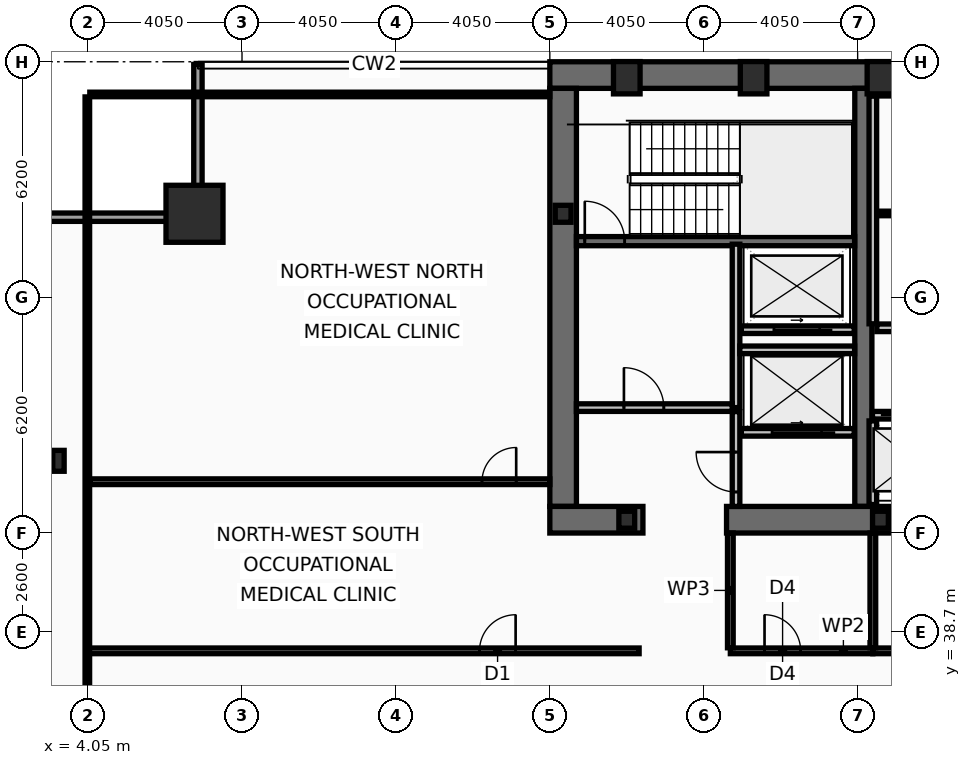
"""IFC4 building model, lengths in metres.
Left out: names, types, materials, properties, quantities, classifications, styles, units other than length and angle.
Written with IfcOpenShell. Run it as: python <this file> out.ifc"""

import sys

from ifc_helpers import new_model, si_unit, direction, frame, frame_2d, origin, origin_2d, place, context, subcontext, project, spatial, rectangle, hollow_rectangle, i_section, extrude, element, fill, save


model = new_model("IFC4")
c1 = context("Model", 3, precision=1e-05, world=origin(), true_north=direction((0.0, 1.0)))
c2 = subcontext(c1, "Body", "Model", "MODEL_VIEW")
j1 = project(units=[si_unit("LENGTHUNIT", "METRE"), si_unit("PLANEANGLEUNIT", "RADIAN")], contexts=[c1])
p1 = place(None, origin())
s1 = spatial("IfcSite", under=j1, at=p1, CompositionType="ELEMENT")
p2 = place(p1, origin())
s2 = spatial("IfcBuilding", under=s1, at=p2, CompositionType="ELEMENT")
p3 = place(p2, frame((0.0, 0.0, 132.6)))
s3 = spatial("IfcBuildingStorey", under=s2, at=p3, CompositionType="ELEMENT", Elevation=132.6)
p4 = place(p3, frame((16.2, 53.35, 0.0), z_axis=(0.0, 0.0, 1.0), x_axis=(1.0, 0.0, 0.0)))
e1 = element("IfcWall", 1, at=p4, inside=s3, PredefinedType="SHEAR", context=c2, shape_type="SweptSolid", body=[
    extrude(rectangle(XDim=40.5, YDim=0.7, at=frame_2d((20.25, 0.0))), origin(), (0.0, 0.0, 1.0), 3.44),
])
p5 = place(p3, frame((16.55, 42.0, 0.0), z_axis=(0.0, 0.0, 1.0), x_axis=(0.0, 1.0, 0.0)))
e2 = element("IfcWall", 2, at=p5, inside=s3, PredefinedType="SHEAR", context=c2, shape_type="SweptSolid", body=[
    extrude(rectangle(XDim=11.0, YDim=0.7, at=frame_2d((5.5, 0.0))), origin(), (0.0, 0.0, 1.0), 3.44),
])
p6 = place(p3, frame((24.45, 42.0, 0.0), z_axis=(0.0, 0.0, 1.0), x_axis=(0.0, 1.0, 0.0)))
e3 = element("IfcWall", 3, at=p6, inside=s3, PredefinedType="SHEAR", context=c2, shape_type="SweptSolid", body=[
    extrude(rectangle(XDim=11.0, YDim=0.45, at=frame_2d((5.5, 0.0))), origin(), (0.0, 0.0, 1.0), 3.44),
])
p7 = place(p3, frame((18.65, 41.65, 0.0), z_axis=(0.0, 0.0, 1.0), x_axis=(-1.0, 0.0, 0.0)))
e4 = element("IfcWall", 4, at=p7, inside=s3, PredefinedType="SHEAR", context=c2, shape_type="SweptSolid", body=[
    extrude(rectangle(XDim=2.45, YDim=0.7, at=frame_2d((1.225, 0.0))), origin(), (0.0, 0.0, 1.0), 3.44),
])
p8 = place(p3, frame((32.3, 41.65, 0.0), z_axis=(0.0, 0.0, 1.0), x_axis=(-1.0, 0.0, 0.0)))
e5 = element("IfcWall", 5, at=p8, inside=s3, PredefinedType="SHEAR", context=c2, shape_type="SweptSolid", body=[
    extrude(rectangle(XDim=11.45, YDim=0.7, at=frame_2d((5.725, 0.0))), origin(), (0.0, 0.0, 1.0), 3.44),
])
p9 = place(p3, frame((16.9, 48.98, 0.0), z_axis=(0.0, 0.0, 1.0), x_axis=(1.0, 0.0, 0.0)))
e6 = element("IfcWall", 6, at=p9, inside=s3, PredefinedType="SHEAR", context=c2, shape_type="SweptSolid", body=[
    extrude(rectangle(XDim=7.32, YDim=0.24, at=frame_2d((3.66, 0.0))), origin(), (0.0, 0.0, 1.0), 3.44),
])
p10 = place(p9, frame((0.22, 0.0, 0.0)))
e7 = element("IfcOpeningElement", 7, at=p10, cuts=e6, PredefinedType="OPENING", context=c2, shape_type="SweptSolid", body=[
    extrude(rectangle(XDim=1.05, YDim=2.15, at=frame_2d((0.525, 1.075))), frame((0.0, 0.13, 0.0), z_axis=(0.0, -1.0, 0.0), x_axis=(1.0, 0.0, 0.0)), (0.0, 0.0, 1.0), 0.26),
])
p11 = place(p3, frame((6.85, 49.7, 0.0), z_axis=(0.0, 0.0, 1.0), x_axis=(1.0, 0.0, 0.0)))
e8 = element("IfcColumn", 8, at=p11, inside=s3, PredefinedType="COLUMN", context=c2, shape_type="SweptSolid", body=[
    extrude(hollow_rectangle(XDim=1.5, YDim=1.5, WallThickness=0.07, at=origin_2d()), origin(), (0.0, 0.0, 1.0), 3.6),
])
for number, where, z_axis, x_axis in (
    (9, (18.225, 53.28, 0.0), (0.0, 0.0, 1.0), (1.0, 0.0, 0.0)),
    (10, (21.562, 53.28, 0.0), (0.0, 0.0, 1.0), (1.0, 0.0, 0.0)),
    (11, (24.9, 53.28, 0.0), (0.0, 0.0, 1.0), (1.0, 0.0, 0.0)),
):
    element("IfcColumn", number, at=place(p3, frame(where, z_axis=z_axis, x_axis=x_axis)), inside=s3, PredefinedType="COLUMN", context=c2, shape_type="SweptSolid", body=[
        extrude(hollow_rectangle(XDim=0.7, YDim=0.85, WallThickness=0.05, at=origin_2d()), origin(), (0.0, 0.0, 1.0), 3.6),
    ])
p12 = place(p3, frame((3.27, 43.2, 0.0), z_axis=(0.0, 0.0, 1.0), x_axis=(1.0, 0.0, 0.0)))
e12 = element("IfcColumn", 12, at=p12, inside=s3, PredefinedType="COLUMN", context=c2, shape_type="SweptSolid", body=[
    extrude(i_section(OverallWidth=0.3, OverallDepth=0.55, WebThickness=0.015, FlangeThickness=0.029, at=origin_2d()), origin(), (0.0, 0.0, 1.0), 3.6),
])
for number, where, z_axis, x_axis in (
    (13, (16.55, 49.7, 0.0), (0.0, 0.0, 1.0), (1.0, 0.0, 0.0)),
    (14, (18.225, 41.65, 0.0), (0.0, 0.0, 1.0), (1.0, 0.0, 0.0)),
    (15, (24.9, 41.65, 0.0), (0.0, 0.0, 1.0), (1.0, 0.0, 0.0)),
):
    element("IfcColumn", number, at=place(p3, frame(where, z_axis=z_axis, x_axis=x_axis)), inside=s3, PredefinedType="COLUMN", context=c2, shape_type="SweptSolid", body=[
        extrude(i_section(OverallWidth=0.416, OverallDepth=0.446, WebThickness=0.039, FlangeThickness=0.063, at=origin_2d()), origin(), (0.0, 0.0, 1.0), 3.6),
    ])
p13 = place(p3, frame((2.92, 49.61, 0.0), z_axis=(0.0, 0.0, 1.0), x_axis=(1.0, 0.0, 0.0)))
e16 = element("IfcWall", 16, at=p13, inside=s3, PredefinedType="SOLIDWALL", context=c2, shape_type="SweptSolid", body=[
    extrude(rectangle(XDim=4.13, YDim=0.22, at=frame_2d((2.065, 0.0))), origin(), (0.0, 0.0, 1.0), 2.09),
])
p14 = place(p3, frame((6.94, 49.72, 0.0), z_axis=(0.0, 0.0, 1.0), x_axis=(0.0, 1.0, 0.0)))
e17 = element("IfcWall", 17, at=p14, inside=s3, PredefinedType="SOLIDWALL", context=c2, shape_type="SweptSolid", body=[
    extrude(rectangle(XDim=3.91, YDim=0.22, at=frame_2d((1.955, 0.0))), origin(), (0.0, 0.0, 1.0), 2.09),
])
p15 = place(p3, frame((24.69, 44.4, 0.0), z_axis=(0.0, 0.0, 1.0), x_axis=(1.0, 0.0, 0.0)))
e18 = element("IfcWall", 18, at=p15, inside=s3, PredefinedType="PARTITIONING", context=c2, shape_type="SweptSolid", body=[
    extrude(rectangle(XDim=6.53, YDim=0.2, at=frame_2d((3.265, 0.0))), origin(), (0.0, 0.0, 1.0), 3.44),
])
p16 = place(p15, frame((0.53, 0.0, 0.0)))
e19 = element("IfcOpeningElement", 19, at=p16, cuts=e18, PredefinedType="OPENING", context=c2, shape_type="SweptSolid", body=[
    extrude(rectangle(XDim=1.1, YDim=2.18, at=frame_2d((0.55, 1.09))), frame((0.0, 0.11, 0.0), z_axis=(0.0, -1.0, 0.0), x_axis=(1.0, 0.0, 0.0)), (0.0, 0.0, 1.0), 0.22),
])
p17 = place(p15, frame((2.69, 0.0, 0.0)))
e20 = element("IfcOpeningElement", 20, at=p17, cuts=e18, PredefinedType="OPENING", context=c2, shape_type="SweptSolid", body=[
    extrude(rectangle(XDim=1.1, YDim=2.18, at=frame_2d((0.55, 1.09))), frame((0.0, 0.11, 0.0), z_axis=(0.0, -1.0, 0.0), x_axis=(1.0, 0.0, 0.0)), (0.0, 0.0, 1.0), 0.22),
])
p18 = place(p15, frame((4.85, 0.0, 0.0)))
e21 = element("IfcOpeningElement", 21, at=p18, cuts=e18, PredefinedType="OPENING", context=c2, shape_type="SweptSolid", body=[
    extrude(rectangle(XDim=1.1, YDim=2.18, at=frame_2d((0.55, 1.09))), frame((0.0, 0.11, 0.0), z_axis=(0.0, -1.0, 0.0), x_axis=(1.0, 0.0, 0.0)), (0.0, 0.0, 1.0), 0.22),
])
p19 = place(p3, frame((24.21, 43.95, 0.0), z_axis=(0.0, 0.0, 1.0), x_axis=(-1.0, 0.0, 0.0)))
e22 = element("IfcWall", 22, at=p19, inside=s3, PredefinedType="PARTITIONING", context=c2, shape_type="SweptSolid", body=[
    extrude(rectangle(XDim=2.97, YDim=0.2, at=frame_2d((1.485, 0.0))), origin(), (0.0, 0.0, 1.0), 3.44),
])
p20 = place(p19, frame((0.86, 0.0, 0.0)))
e23 = element("IfcOpeningElement", 23, at=p20, cuts=e22, PredefinedType="OPENING", context=c2, shape_type="SweptSolid", body=[
    extrude(rectangle(XDim=1.3, YDim=2.18, at=frame_2d((0.65, 1.09))), frame((0.0, 0.11, 0.0), z_axis=(0.0, -1.0, 0.0), x_axis=(1.0, 0.0, 0.0)), (0.0, 0.0, 1.0), 0.22),
])
p21 = place(p3, frame((24.21, 46.65, 0.0), z_axis=(0.0, 0.0, 1.0), x_axis=(-1.0, 0.0, 0.0)))
e24 = element("IfcWall", 24, at=p21, inside=s3, PredefinedType="PARTITIONING", context=c2, shape_type="SweptSolid", body=[
    extrude(rectangle(XDim=2.97, YDim=0.2, at=frame_2d((1.485, 0.0))), origin(), (0.0, 0.0, 1.0), 3.44),
])
p22 = place(p21, frame((0.91, 0.0, 0.0)))
e25 = element("IfcOpeningElement", 25, at=p22, cuts=e24, PredefinedType="OPENING", context=c2, shape_type="SweptSolid", body=[
    extrude(rectangle(XDim=1.2, YDim=2.18, at=frame_2d((0.6, 1.09))), frame((0.0, 0.11, 0.0), z_axis=(0.0, -1.0, 0.0), x_axis=(1.0, 0.0, 0.0)), (0.0, 0.0, 1.0), 0.22),
])
p23 = place(p3, frame((21.1, 44.6, 0.0), z_axis=(0.0, 0.0, 1.0), x_axis=(0.0, 1.0, 0.0)))
e26 = element("IfcWall", 26, at=p23, inside=s3, PredefinedType="PARTITIONING", context=c2, shape_type="SweptSolid", body=[
    extrude(rectangle(XDim=4.3, YDim=0.2, at=frame_2d((2.15, 0.0))), origin(), (0.0, 0.0, 1.0), 3.44),
])
p24 = place(p3, frame((16.9, 44.6, 0.0), z_axis=(0.0, 0.0, 1.0), x_axis=(1.0, 0.0, 0.0)))
e27 = element("IfcWall", 27, at=p24, inside=s3, PredefinedType="PARTITIONING", context=c2, shape_type="SweptSolid", body=[
    extrude(rectangle(XDim=4.1, YDim=0.2, at=frame_2d((2.05, 0.0))), origin(), (0.0, 0.0, 1.0), 3.44),
])
p25 = place(p24, frame((1.25, 0.0, 0.0)))
e28 = element("IfcOpeningElement", 28, at=p25, cuts=e27, PredefinedType="OPENING", context=c2, shape_type="SweptSolid", body=[
    extrude(rectangle(XDim=1.05, YDim=2.15, at=frame_2d((0.525, 1.075))), frame((0.0, 0.11, 0.0), z_axis=(0.0, -1.0, 0.0), x_axis=(1.0, 0.0, 0.0)), (0.0, 0.0, 1.0), 0.22),
])
p26 = place(p3, frame((21.2, 46.12, 0.0), z_axis=(0.0, 0.0, 1.0), x_axis=(1.0, 0.0, 0.0)))
e29 = element("IfcWall", 29, at=p26, inside=s3, PredefinedType="PARTITIONING", context=c2, shape_type="SweptSolid", body=[
    extrude(rectangle(XDim=3.02, YDim=0.2, at=frame_2d((1.51, 0.0))), origin(), (0.0, 0.0, 1.0), 3.44),
])
p27 = place(p3, frame((21.1, 42.0, 0.0), z_axis=(0.0, 0.0, 1.0), x_axis=(0.0, 1.0, 0.0)))
e30 = element("IfcWall", 30, at=p27, inside=s3, PredefinedType="PARTITIONING", context=c2, shape_type="SweptSolid", body=[
    extrude(rectangle(XDim=2.495, YDim=0.2, at=frame_2d((1.248, 0.0))), origin(), (0.0, 0.0, 1.0), 3.44),
])
p28 = place(p27, frame((0.38, 0.0, 0.0)))
e31 = element("IfcOpeningElement", 31, at=p28, cuts=e30, PredefinedType="OPENING", context=c2, shape_type="SweptSolid", body=[
    extrude(rectangle(XDim=1.05, YDim=2.15, at=frame_2d((0.525, 1.075))), frame((0.0, 0.11, 0.0), z_axis=(0.0, -1.0, 0.0), x_axis=(1.0, 0.0, 0.0)), (0.0, 0.0, 1.0), 0.22),
])
p29 = place(p3, frame((24.7, 46.805, 0.0), z_axis=(0.0, 0.0, 1.0), x_axis=(0.0, 1.0, 0.0)))
e32 = element("IfcWall", 32, at=p29, inside=s3, PredefinedType="PARTITIONING", context=c2, shape_type="SweptSolid", body=[
    extrude(rectangle(XDim=5.99, YDim=0.2, at=frame_2d((2.995, 0.0))), origin(), (0.0, 0.0, 1.0), 3.44),
])
p30 = place(p3, frame((24.805, 52.86, 0.0), z_axis=(0.0, 0.0, 1.0), x_axis=(1.0, 0.0, 0.0)))
e33 = element("IfcWall", 33, at=p30, inside=s3, PredefinedType="PARTITIONING", context=c2, shape_type="SweptSolid", body=[
    extrude(rectangle(XDim=7.51, YDim=0.12, at=frame_2d((3.755, 0.0))), origin(), (0.0, 0.0, 1.0), 3.44),
])
p31 = place(p3, frame((24.805, 49.709, 0.0), z_axis=(0.0, 0.0, 1.0), x_axis=(1.0, 0.0, 0.0)))
e34 = element("IfcWall", 34, at=p31, inside=s3, PredefinedType="PARTITIONING", context=c2, shape_type="SweptSolid", body=[
    extrude(rectangle(XDim=7.51, YDim=0.12, at=frame_2d((3.755, 0.0))), origin(), (0.0, 0.0, 1.0), 3.44),
])
p32 = place(p31, frame((2.4, 0.0, 0.0)))
e35 = element("IfcOpeningElement", 35, at=p32, cuts=e34, PredefinedType="OPENING", context=c2, shape_type="SweptSolid", body=[
    extrude(rectangle(XDim=0.9, YDim=2.05, at=frame_2d((0.45, 1.025))), frame((0.0, 0.07, 0.0), z_axis=(0.0, -1.0, 0.0), x_axis=(1.0, 0.0, 0.0)), (0.0, 0.0, 1.0), 0.14),
])
p33 = place(p3, frame((24.805, 46.7, 0.0), z_axis=(0.0, 0.0, 1.0), x_axis=(1.0, 0.0, 0.0)))
e36 = element("IfcWall", 36, at=p33, inside=s3, PredefinedType="PARTITIONING", context=c2, shape_type="SweptSolid", body=[
    extrude(rectangle(XDim=7.51, YDim=0.2, at=frame_2d((3.755, 0.0))), origin(), (0.0, 0.0, 1.0), 3.44),
])
p34 = place(p33, frame((2.4, 0.0, 0.0)))
e37 = element("IfcOpeningElement", 37, at=p34, cuts=e36, PredefinedType="OPENING", context=c2, shape_type="SweptSolid", body=[
    extrude(rectangle(XDim=0.95, YDim=2.1, at=frame_2d((0.475, 1.05))), frame((0.0, 0.11, 0.0), z_axis=(0.0, -1.0, 0.0), x_axis=(1.0, 0.0, 0.0)), (0.0, 0.0, 1.0), 0.22),
])
p35 = place(p3, frame((24.7, 42.05, 0.0), z_axis=(0.0, 0.0, 1.0), x_axis=(0.0, 1.0, 0.0)))
e38 = element("IfcWall", 38, at=p35, inside=s3, PredefinedType="PARTITIONING", context=c2, shape_type="SweptSolid", body=[
    extrude(rectangle(XDim=2.2, YDim=0.2, at=frame_2d((1.1, 0.0))), origin(), (0.0, 0.0, 1.0), 3.44),
])
p36 = place(p3, frame((20.95, 38.2, 0.0), z_axis=(0.0, 0.0, 1.0), x_axis=(1.0, 0.0, 0.0)))
e39 = element("IfcWall", 39, at=p36, inside=s3, PredefinedType="PARTITIONING", context=c2, shape_type="SweptSolid", body=[
    extrude(rectangle(XDim=3.75, YDim=0.15, at=frame_2d((1.875, 0.0))), origin(), (0.0, 0.0, 1.0), 2.73),
])
p37 = place(p36, frame((0.9, 0.0, 0.0)))
e40 = element("IfcOpeningElement", 40, at=p37, cuts=e39, PredefinedType="OPENING", context=c2, shape_type="SweptSolid", body=[
    extrude(rectangle(XDim=0.95, YDim=2.05, at=frame_2d((0.475, 1.025))), frame((0.0, 0.085, 0.0), z_axis=(0.0, -1.0, 0.0), x_axis=(1.0, 0.0, 0.0)), (0.0, 0.0, 1.0), 0.17),
])
p38 = place(p3, frame((24.7, 38.2, 0.0), z_axis=(0.0, 0.0, 1.0), x_axis=(1.0, 0.0, 0.0)))
e41 = element("IfcWall", 41, at=p38, inside=s3, PredefinedType="PARTITIONING", context=c2, shape_type="SweptSolid", body=[
    extrude(rectangle(XDim=3.7, YDim=0.15, at=frame_2d((1.85, 0.0))), origin(), (0.0, 0.0, 1.0), 2.73),
])
p39 = place(p38, frame((0.9, 0.0, 0.0)))
e42 = element("IfcOpeningElement", 42, at=p39, cuts=e41, PredefinedType="OPENING", context=c2, shape_type="SweptSolid", body=[
    extrude(rectangle(XDim=0.95, YDim=2.05, at=frame_2d((0.475, 1.025))), frame((0.0, 0.085, 0.0), z_axis=(0.0, -1.0, 0.0), x_axis=(1.0, 0.0, 0.0)), (0.0, 0.0, 1.0), 0.17),
])
p40 = place(p3, frame((20.95, 38.28, 0.0), z_axis=(0.0, 0.0, 1.0), x_axis=(0.0, 1.0, 0.0)))
e43 = element("IfcWall", 43, at=p40, inside=s3, PredefinedType="PARTITIONING", context=c2, shape_type="SweptSolid", body=[
    extrude(rectangle(XDim=3.02, YDim=0.15, at=frame_2d((1.51, 0.0))), origin(), (0.0, 0.0, 1.0), 3.44),
])
p41 = place(p3, frame((24.7, 38.28, 0.0), z_axis=(0.0, 0.0, 1.0), x_axis=(0.0, 1.0, 0.0)))
e44 = element("IfcWall", 44, at=p41, inside=s3, PredefinedType="PARTITIONING", context=c2, shape_type="SweptSolid", body=[
    extrude(rectangle(XDim=3.02, YDim=0.15, at=frame_2d((1.51, 0.0))), origin(), (0.0, 0.0, 1.0), 2.73),
])
p42 = place(p3, frame((4.03, 38.2, 0.0), z_axis=(0.0, 0.0, 1.0), x_axis=(1.0, 0.0, 0.0)))
e45 = element("IfcWall", 45, at=p42, inside=s3, PredefinedType="PARTITIONING", context=c2, shape_type="SweptSolid", body=[
    extrude(rectangle(XDim=14.52, YDim=0.15, at=frame_2d((7.26, 0.0))), origin(), (0.0, 0.0, 1.0), 2.73),
])
p43 = place(p42, frame((10.32, 0.0, 0.0)))
e46 = element("IfcOpeningElement", 46, at=p43, cuts=e45, PredefinedType="OPENING", context=c2, shape_type="SweptSolid", body=[
    extrude(rectangle(XDim=0.95, YDim=2.05, at=frame_2d((0.475, 1.025))), frame((0.0, 0.085, 0.0), z_axis=(0.0, -1.0, 0.0), x_axis=(1.0, 0.0, 0.0)), (0.0, 0.0, 1.0), 0.17),
])
p44 = place(p3, frame((4.095, 42.65, 0.0), z_axis=(0.0, 0.0, 1.0), x_axis=(1.0, 0.0, 0.0)))
e47 = element("IfcWall", 47, at=p44, inside=s3, PredefinedType="PARTITIONING", context=c2, shape_type="SweptSolid", body=[
    extrude(rectangle(XDim=12.105, YDim=0.15, at=frame_2d((6.052, 0.0))), origin(), (0.0, 0.0, 1.0), 2.09),
])
p45 = place(p44, frame((10.32, 0.0, 0.0)))
e48 = element("IfcOpeningElement", 48, at=p45, cuts=e47, PredefinedType="OPENING", context=c2, shape_type="SweptSolid", body=[
    extrude(rectangle(XDim=0.9, YDim=2.05, at=frame_2d((0.45, 1.025))), frame((0.0, 0.085, 0.0), z_axis=(0.0, -1.0, 0.0), x_axis=(1.0, 0.0, 0.0)), (0.0, 0.0, 1.0), 0.17),
])
p46 = place(p3, frame((4.03, 10.665, 0.0), z_axis=(0.0, 0.0, 1.0), x_axis=(0.0, 1.0, 0.0)))
e49 = element("IfcWall", 49, at=p46, inside=s3, PredefinedType="PARTITIONING", context=c2, shape_type="SweptSolid", body=[
    extrude(rectangle(XDim=42.11, YDim=0.12, at=frame_2d((21.055, 0.0))), origin(), (0.0, 0.0, 1.0), 1.83),
])
p47 = place(p3, frame((4.095, 52.84, 0.0), z_axis=(0.0, 0.0, 1.0), x_axis=(1.0, 0.0, 0.0)))
e50 = element("IfcWall", 50, at=p47, inside=s3, PredefinedType="PARTITIONING", context=c2, shape_type="SweptSolid", body=[
    extrude(rectangle(XDim=12.105, YDim=0.12, at=frame_2d((6.052, 0.0))), origin(), (0.0, 0.0, 1.0), 3.44),
])
p48 = place(p10, origin())
e51 = element("IfcDoor", 51, at=p48, inside=s3, OperationType="SINGLE_SWING_LEFT", PredefinedType="DOOR", context=c2, shape_type="SweptSolid", body=[
    extrude(rectangle(XDim=1.05, YDim=2.15, at=frame_2d((0.525, 1.075))), frame((0.0, 0.025, 0.0), z_axis=(0.0, -1.0, 0.0), x_axis=(1.0, 0.0, 0.0)), (0.0, 0.0, 1.0), 0.05),
])
fill(e7, e51)
p49 = place(p20, origin())
e52 = element("IfcDoor", 52, at=p49, inside=s3, OperationType="SLIDING_TO_LEFT", PredefinedType="DOOR", context=c2, shape_type="SweptSolid", body=[
    extrude(rectangle(XDim=1.3, YDim=2.18, at=frame_2d((0.65, 1.09))), frame((0.0, 0.025, 0.0), z_axis=(0.0, -1.0, 0.0), x_axis=(1.0, 0.0, 0.0)), (0.0, 0.0, 1.0), 0.05),
])
fill(e23, e52)
p50 = place(p22, origin())
e53 = element("IfcDoor", 53, at=p50, inside=s3, OperationType="SLIDING_TO_LEFT", PredefinedType="DOOR", context=c2, shape_type="SweptSolid", body=[
    extrude(rectangle(XDim=1.2, YDim=2.18, at=frame_2d((0.6, 1.09))), frame((0.0, 0.025, 0.0), z_axis=(0.0, -1.0, 0.0), x_axis=(1.0, 0.0, 0.0)), (0.0, 0.0, 1.0), 0.05),
])
fill(e25, e53)
p51 = place(p25, origin())
e54 = element("IfcDoor", 54, at=p51, inside=s3, OperationType="SINGLE_SWING_LEFT", PredefinedType="DOOR", context=c2, shape_type="SweptSolid", body=[
    extrude(rectangle(XDim=1.05, YDim=2.15, at=frame_2d((0.525, 1.075))), frame((0.0, 0.025, 0.0), z_axis=(0.0, -1.0, 0.0), x_axis=(1.0, 0.0, 0.0)), (0.0, 0.0, 1.0), 0.05),
])
fill(e28, e54)
p52 = place(p28, origin())
e55 = element("IfcDoor", 55, at=p52, inside=s3, OperationType="SINGLE_SWING_RIGHT", PredefinedType="DOOR", context=c2, shape_type="SweptSolid", body=[
    extrude(rectangle(XDim=1.05, YDim=2.15, at=frame_2d((0.525, 1.075))), frame((0.0, 0.025, 0.0), z_axis=(0.0, -1.0, 0.0), x_axis=(1.0, 0.0, 0.0)), (0.0, 0.0, 1.0), 0.05),
])
fill(e31, e55)
p53 = place(p37, origin())
e56 = element("IfcDoor", 56, at=p53, inside=s3, OperationType="SINGLE_SWING_LEFT", PredefinedType="DOOR", context=c2, shape_type="SweptSolid", body=[
    extrude(rectangle(XDim=0.95, YDim=2.05, at=frame_2d((0.475, 1.025))), frame((0.0, 0.025, 0.0), z_axis=(0.0, -1.0, 0.0), x_axis=(1.0, 0.0, 0.0)), (0.0, 0.0, 1.0), 0.05),
])
fill(e40, e56)
p54 = place(p43, origin())
e57 = element("IfcDoor", 57, at=p54, inside=s3, OperationType="SINGLE_SWING_RIGHT", PredefinedType="DOOR", context=c2, shape_type="SweptSolid", body=[
    extrude(rectangle(XDim=0.95, YDim=2.05, at=frame_2d((0.475, 1.025))), frame((0.0, 0.025, 0.0), z_axis=(0.0, -1.0, 0.0), x_axis=(1.0, 0.0, 0.0)), (0.0, 0.0, 1.0), 0.05),
])
fill(e46, e57)
p55 = place(p45, origin())
e58 = element("IfcDoor", 58, at=p55, inside=s3, OperationType="SINGLE_SWING_RIGHT", PredefinedType="DOOR", context=c2, shape_type="SweptSolid", body=[
    extrude(rectangle(XDim=0.9, YDim=2.05, at=frame_2d((0.45, 1.025))), frame((0.0, 0.025, 0.0), z_axis=(0.0, -1.0, 0.0), x_axis=(1.0, 0.0, 0.0)), (0.0, 0.0, 1.0), 0.05),
])
fill(e48, e58)
save(model, sys.argv[1])
